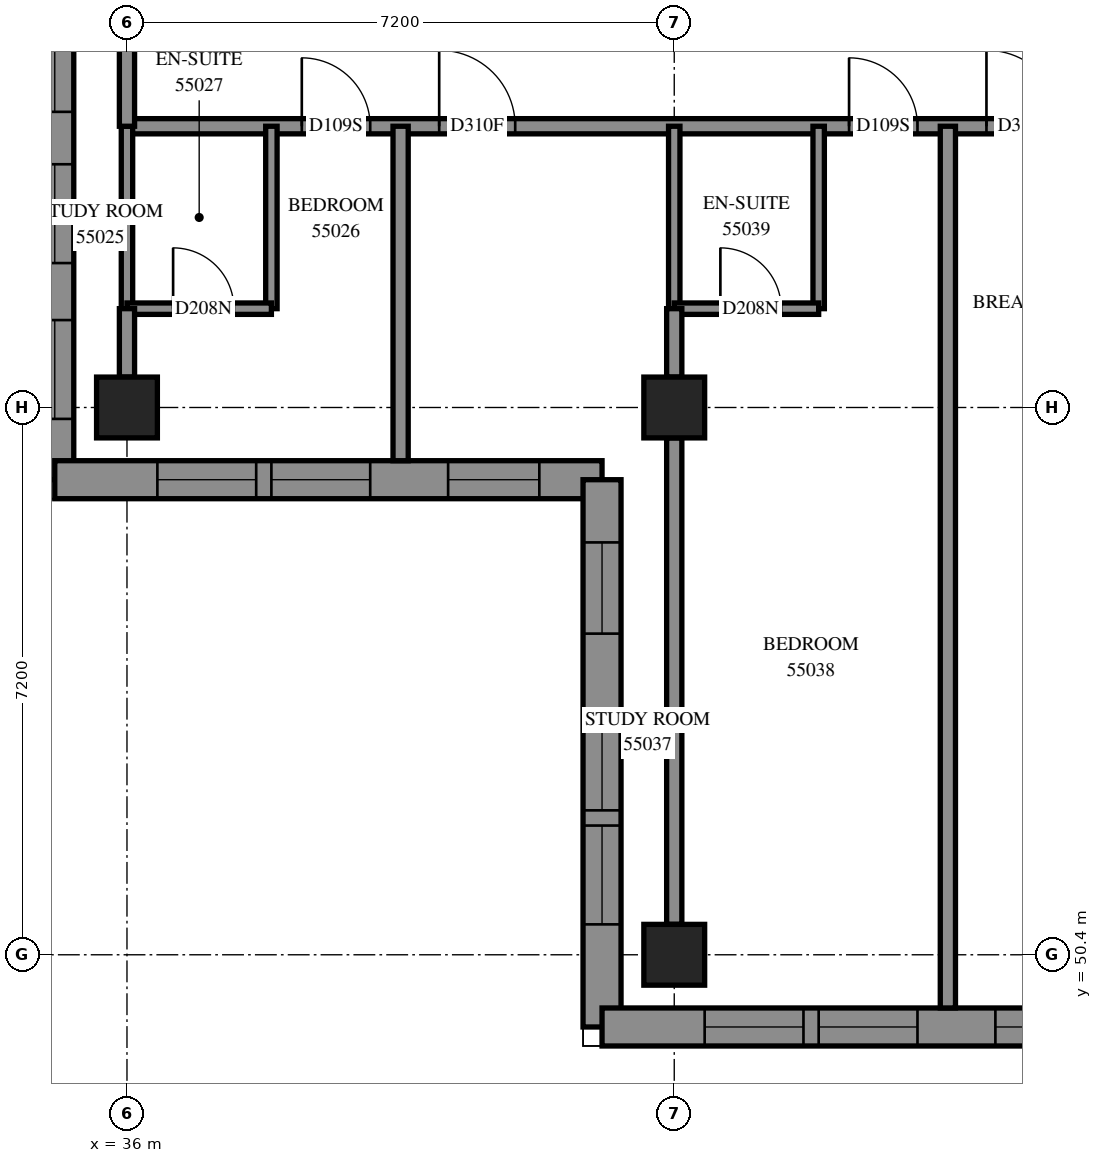
"""IFC4 building model, lengths in metres.
Left out: names, types, materials, properties, quantities, classifications, styles, units other than length and angle.
Written with IfcOpenShell. Run it as: python <this file> out.ifc"""

import sys

from ifc_helpers import new_model, si_unit, direction, frame, frame_2d, origin, origin_2d, place, context, subcontext, project, spatial, polyline, rectangle, outline, extrude, element, fill, save


model = new_model("IFC4")
c1 = context("Model", 3, precision=1e-05, world=origin(), true_north=direction((0.0, 1.0)))
c2 = subcontext(c1, "Body", "Model", "MODEL_VIEW")
j1 = project(units=[si_unit("LENGTHUNIT", "METRE"), si_unit("PLANEANGLEUNIT", "RADIAN")], contexts=[c1])
p1 = place(None, origin())
s1 = spatial("IfcSite", under=j1, at=p1, CompositionType="ELEMENT")
p2 = place(p1, origin())
s2 = spatial("IfcBuilding", under=s1, at=p2, CompositionType="ELEMENT")
p3 = place(p2, frame((0.0, 0.0, 203.2)))
s3 = spatial("IfcBuildingStorey", under=s2, at=p3, CompositionType="ELEMENT", Elevation=203.2)
for number, where, z_axis, x_axis in (
    (1, (36.0, 57.6, 0.0), (0.0, 0.0, 1.0), (1.0, 0.0, 0.0)),
    (2, (43.2, 50.4, 0.0), (0.0, 0.0, 1.0), (1.0, 0.0, 0.0)),
    (3, (43.2, 57.6, 0.0), (0.0, 0.0, 1.0), (1.0, 0.0, 0.0)),
):
    element("IfcColumn", number, at=place(p3, frame(where, z_axis=z_axis, x_axis=x_axis)), inside=s3, PredefinedType="COLUMN", context=c2, shape_type="SweptSolid", body=[
        extrude(rectangle(XDim=0.8, YDim=0.8, at=origin_2d()), origin(), (0.0, 0.0, 1.0), 3.1),
    ])
p4 = place(p3, frame((35.05, 62.829, 0.0), z_axis=(0.0, 0.0, 1.0), x_axis=(0.0, -1.0, 0.0)))
e4 = element("IfcWall", 4, at=p4, inside=s3, PredefinedType="SOLIDWALL", context=c2, shape_type="SweptSolid", body=[
    extrude(outline(polyline([(0.25, -0.25), (6.429, -0.25), (5.929, 0.25), (-0.25, 0.25), (0.25, -0.25)])), origin(), (0.0, 0.0, 1.0), 3.1),
])
p5 = place(p4, frame((2.029, 0.0, 0.45)))
e5 = element("IfcOpeningElement", 5, at=p5, cuts=e4, PredefinedType="OPENING", context=c2, shape_type="SweptSolid", body=[
    extrude(rectangle(XDim=1.3, YDim=2.5, at=frame_2d((0.65, 1.25))), frame((0.0, 0.26, 0.0), z_axis=(0.0, -1.0, 0.0), x_axis=(1.0, 0.0, 0.0)), (0.0, 0.0, 1.0), 0.52),
])
p6 = place(p4, frame((4.079, 0.0, 0.45)))
e6 = element("IfcOpeningElement", 6, at=p6, cuts=e4, PredefinedType="OPENING", context=c2, shape_type="SweptSolid", body=[
    extrude(rectangle(XDim=1.3, YDim=2.5, at=frame_2d((0.65, 1.25))), frame((0.0, 0.26, 0.0), z_axis=(0.0, -1.0, 0.0), x_axis=(1.0, 0.0, 0.0)), (0.0, 0.0, 1.0), 0.52),
])
p7 = place(p4, frame((0.34, 0.0, 0.45)))
e7 = element("IfcOpeningElement", 7, at=p7, cuts=e4, PredefinedType="OPENING", context=c2, shape_type="SweptSolid", body=[
    extrude(rectangle(XDim=1.0, YDim=2.5, at=frame_2d((0.5, 1.25))), frame((0.0, 0.26, 0.0), z_axis=(0.0, -1.0, 0.0), x_axis=(1.0, 0.0, 0.0)), (0.0, 0.0, 1.0), 0.52),
])
p8 = place(p3, frame((35.05, 56.65, 0.0), z_axis=(0.0, 0.0, 1.0), x_axis=(1.0, 0.0, 0.0)))
e8 = element("IfcWall", 8, at=p8, inside=s3, PredefinedType="SOLIDWALL", context=c2, shape_type="SweptSolid", body=[
    extrude(outline(polyline([(-0.25, -0.25), (6.95, -0.25), (7.45, 0.25), (0.25, 0.25), (-0.25, -0.25)])), origin(), (0.0, 0.0, 1.0), 3.1),
])
p9 = place(p8, frame((1.35, 0.0, 0.45)))
e9 = element("IfcOpeningElement", 9, at=p9, cuts=e8, PredefinedType="OPENING", context=c2, shape_type="SweptSolid", body=[
    extrude(rectangle(XDim=1.3, YDim=2.5, at=frame_2d((0.65, 1.25))), frame((0.0, 0.26, 0.0), z_axis=(0.0, -1.0, 0.0), x_axis=(1.0, 0.0, 0.0)), (0.0, 0.0, 1.0), 0.52),
])
p10 = place(p8, frame((2.85, 0.0, 0.45)))
e10 = element("IfcOpeningElement", 10, at=p10, cuts=e8, PredefinedType="OPENING", context=c2, shape_type="SweptSolid", body=[
    extrude(rectangle(XDim=1.3, YDim=2.5, at=frame_2d((0.65, 1.25))), frame((0.0, 0.26, 0.0), z_axis=(0.0, -1.0, 0.0), x_axis=(1.0, 0.0, 0.0)), (0.0, 0.0, 1.0), 0.52),
])
p11 = place(p8, frame((5.175, 0.0, 0.45)))
e11 = element("IfcOpeningElement", 11, at=p11, cuts=e8, PredefinedType="OPENING", context=c2, shape_type="SweptSolid", body=[
    extrude(rectangle(XDim=1.2, YDim=2.5, at=frame_2d((0.6, 1.25))), frame((0.0, 0.26, 0.0), z_axis=(0.0, -1.0, 0.0), x_axis=(1.0, 0.0, 0.0)), (0.0, 0.0, 1.0), 0.52),
])
p12 = place(p3, frame((42.25, 56.65, 0.0), z_axis=(0.0, 0.0, 1.0), x_axis=(0.0, -1.0, 0.0)))
e12 = element("IfcWall", 12, at=p12, inside=s3, PredefinedType="SOLIDWALL", context=c2, shape_type="SweptSolid", body=[
    extrude(outline(polyline([(0.25, -0.25), (7.45, -0.25), (6.95, 0.25), (-0.25, 0.25), (0.25, -0.25)])), origin(), (0.0, 0.0, 1.0), 3.1),
])
p13 = place(p12, frame((3.05, 0.0, 0.45)))
e13 = element("IfcOpeningElement", 13, at=p13, cuts=e12, PredefinedType="OPENING", context=c2, shape_type="SweptSolid", body=[
    extrude(rectangle(XDim=1.3, YDim=2.5, at=frame_2d((0.65, 1.25))), frame((0.0, 0.26, 0.0), z_axis=(0.0, -1.0, 0.0), x_axis=(1.0, 0.0, 0.0)), (0.0, 0.0, 1.0), 0.52),
])
p14 = place(p12, frame((4.55, 0.0, 0.45)))
e14 = element("IfcOpeningElement", 14, at=p14, cuts=e12, PredefinedType="OPENING", context=c2, shape_type="SweptSolid", body=[
    extrude(rectangle(XDim=1.3, YDim=2.5, at=frame_2d((0.65, 1.25))), frame((0.0, 0.26, 0.0), z_axis=(0.0, -1.0, 0.0), x_axis=(1.0, 0.0, 0.0)), (0.0, 0.0, 1.0), 0.52),
])
p15 = place(p12, frame((0.825, 0.0, 0.45)))
e15 = element("IfcOpeningElement", 15, at=p15, cuts=e12, PredefinedType="OPENING", context=c2, shape_type="SweptSolid", body=[
    extrude(rectangle(XDim=1.2, YDim=2.5, at=frame_2d((0.6, 1.25))), frame((0.0, 0.26, 0.0), z_axis=(0.0, -1.0, 0.0), x_axis=(1.0, 0.0, 0.0)), (0.0, 0.0, 1.0), 0.52),
])
p16 = place(p3, frame((42.25, 49.45, 0.0), z_axis=(0.0, 0.0, 1.0), x_axis=(1.0, 0.0, 0.0)))
e16 = element("IfcWall", 16, at=p16, inside=s3, PredefinedType="SOLIDWALL", context=c2, shape_type="SweptSolid", body=[
    extrude(outline(polyline([(-0.25, -0.25), (6.95, -0.25), (7.45, 0.25), (0.25, 0.25), (-0.25, -0.25)])), origin(), (0.0, 0.0, 1.0), 3.1),
])
p17 = place(p16, frame((1.35, 0.0, 0.45)))
e17 = element("IfcOpeningElement", 17, at=p17, cuts=e16, PredefinedType="OPENING", context=c2, shape_type="SweptSolid", body=[
    extrude(rectangle(XDim=1.3, YDim=2.5, at=frame_2d((0.65, 1.25))), frame((0.0, 0.26, 0.0), z_axis=(0.0, -1.0, 0.0), x_axis=(1.0, 0.0, 0.0)), (0.0, 0.0, 1.0), 0.52),
])
p18 = place(p16, frame((2.85, 0.0, 0.45)))
e18 = element("IfcOpeningElement", 18, at=p18, cuts=e16, PredefinedType="OPENING", context=c2, shape_type="SweptSolid", body=[
    extrude(rectangle(XDim=1.3, YDim=2.5, at=frame_2d((0.65, 1.25))), frame((0.0, 0.26, 0.0), z_axis=(0.0, -1.0, 0.0), x_axis=(1.0, 0.0, 0.0)), (0.0, 0.0, 1.0), 0.52),
])
p19 = place(p16, frame((5.175, 0.0, 0.45)))
e19 = element("IfcOpeningElement", 19, at=p19, cuts=e16, PredefinedType="OPENING", context=c2, shape_type="SweptSolid", body=[
    extrude(rectangle(XDim=1.2, YDim=2.5, at=frame_2d((0.6, 1.25))), frame((0.0, 0.26, 0.0), z_axis=(0.0, -1.0, 0.0), x_axis=(1.0, 0.0, 0.0)), (0.0, 0.0, 1.0), 0.52),
])
p20 = place(p3, frame((36.0, 61.3, 0.0), z_axis=(0.0, 0.0, 1.0), x_axis=(1.0, 0.0, 0.0)))
e20 = element("IfcWall", 20, at=p20, inside=s3, PredefinedType="PARTITIONING", context=c2, shape_type="SweptSolid", body=[
    extrude(rectangle(XDim=16.9, YDim=0.2, at=frame_2d((8.45, 0.0))), origin(), (0.0, 0.0, 1.0), 3.1),
])
p21 = place(p20, frame((2.3, 0.0, 0.0)))
e21 = element("IfcOpeningElement", 21, at=p21, cuts=e20, PredefinedType="OPENING", context=c2, shape_type="SweptSolid", body=[
    extrude(rectangle(XDim=0.9, YDim=2.1, at=frame_2d((0.45, 1.05))), frame((0.0, 0.11, 0.0), z_axis=(0.0, -1.0, 0.0), x_axis=(1.0, 0.0, 0.0)), (0.0, 0.0, 1.0), 0.22),
])
p22 = place(p20, frame((4.107, 0.0, 0.0)))
e22 = element("IfcOpeningElement", 22, at=p22, cuts=e20, PredefinedType="OPENING", context=c2, shape_type="SweptSolid", body=[
    extrude(rectangle(XDim=1.0, YDim=2.1, at=frame_2d((0.5, 1.05))), frame((0.0, 0.11, 0.0), z_axis=(0.0, -1.0, 0.0), x_axis=(1.0, 0.0, 0.0)), (0.0, 0.0, 1.0), 0.22),
])
p23 = place(p20, frame((9.5, 0.0, 0.0)))
e23 = element("IfcOpeningElement", 23, at=p23, cuts=e20, PredefinedType="OPENING", context=c2, shape_type="SweptSolid", body=[
    extrude(rectangle(XDim=0.9, YDim=2.1, at=frame_2d((0.45, 1.05))), frame((0.0, 0.11, 0.0), z_axis=(0.0, -1.0, 0.0), x_axis=(1.0, 0.0, 0.0)), (0.0, 0.0, 1.0), 0.22),
])
p24 = place(p20, frame((11.307, 0.0, 0.0)))
e24 = element("IfcOpeningElement", 24, at=p24, cuts=e20, PredefinedType="OPENING", context=c2, shape_type="SweptSolid", body=[
    extrude(rectangle(XDim=1.0, YDim=2.1, at=frame_2d((0.5, 1.05))), frame((0.0, 0.11, 0.0), z_axis=(0.0, -1.0, 0.0), x_axis=(1.0, 0.0, 0.0)), (0.0, 0.0, 1.0), 0.22),
])
p25 = place(p20, frame((15.647, 0.0, 0.0)))
e25 = element("IfcOpeningElement", 25, at=p25, cuts=e20, PredefinedType="OPENING", context=c2, shape_type="SweptSolid", body=[
    extrude(rectangle(XDim=1.0, YDim=2.1, at=frame_2d((0.5, 1.05))), frame((0.0, 0.11, 0.0), z_axis=(0.0, -1.0, 0.0), x_axis=(1.0, 0.0, 0.0)), (0.0, 0.0, 1.0), 0.22),
])
p26 = place(p3, frame((46.8, 49.7, 0.0), z_axis=(0.0, 0.0, 1.0), x_axis=(0.0, 1.0, 0.0)))
e26 = element("IfcWall", 26, at=p26, inside=s3, PredefinedType="PARTITIONING", context=c2, shape_type="SweptSolid", body=[
    extrude(rectangle(XDim=11.6, YDim=0.2, at=frame_2d((5.8, 0.0))), origin(), (0.0, 0.0, 1.0), 3.1),
])
p27 = place(p3, frame((43.2, 50.8, 0.0), z_axis=(0.0, 0.0, 1.0), x_axis=(0.0, 1.0, 0.0)))
e27 = element("IfcWall", 27, at=p27, inside=s3, PredefinedType="PARTITIONING", context=c2, shape_type="SweptSolid", body=[
    extrude(rectangle(XDim=6.4, YDim=0.2, at=frame_2d((3.2, 0.0))), origin(), (0.0, 0.0, 1.0), 2.6),
])
p28 = place(p3, frame((39.6, 56.9, 0.0), z_axis=(0.0, 0.0, 1.0), x_axis=(0.0, 1.0, 0.0)))
e28 = element("IfcWall", 28, at=p28, inside=s3, PredefinedType="PARTITIONING", context=c2, shape_type="SweptSolid", body=[
    extrude(rectangle(XDim=4.4, YDim=0.2, at=frame_2d((2.2, 0.0))), origin(), (0.0, 0.0, 1.0), 3.1),
])
p29 = place(p3, frame((37.9, 58.9, 0.0), z_axis=(0.0, 0.0, 1.0), x_axis=(0.0, 1.0, 0.0)))
e29 = element("IfcWall", 29, at=p29, inside=s3, PredefinedType="PARTITIONING", context=c2, shape_type="SweptSolid", body=[
    extrude(rectangle(XDim=2.4, YDim=0.15, at=frame_2d((1.2, 0.0))), origin(), (0.0, 0.0, 1.0), 3.1),
])
p30 = place(p3, frame((36.0, 58.9, 0.0), z_axis=(0.0, 0.0, 1.0), x_axis=(0.0, 1.0, 0.0)))
e30 = element("IfcWall", 30, at=p30, inside=s3, PredefinedType="PARTITIONING", context=c2, shape_type="SweptSolid", body=[
    extrude(rectangle(XDim=2.4, YDim=0.15, at=frame_2d((1.2, 0.0))), origin(), (0.0, 0.0, 1.0), 2.6),
])
for number, where, z_axis, x_axis in (
    (31, (45.1, 58.9, 0.0), (0.0, 0.0, 1.0), (0.0, 1.0, 0.0)),
    (32, (43.2, 58.9, 0.0), (0.0, 0.0, 1.0), (0.0, 1.0, 0.0)),
):
    element("IfcWall", number, at=place(p3, frame(where, z_axis=z_axis, x_axis=x_axis)), inside=s3, PredefinedType="PARTITIONING", context=c2, shape_type="SweptSolid", body=[
        extrude(rectangle(XDim=2.4, YDim=0.15, at=frame_2d((1.2, 0.0))), origin(), (0.0, 0.0, 1.0), 3.1),
    ])
p31 = place(p3, frame((36.0, 61.3, 0.0), z_axis=(0.0, 0.0, 1.0), x_axis=(0.0, 1.0, 0.0)))
e33 = element("IfcWall", 33, at=p31, inside=s3, PredefinedType="PARTITIONING", context=c2, shape_type="SweptSolid", body=[
    extrude(rectangle(XDim=2.2, YDim=0.2, at=frame_2d((1.1, 0.0))), origin(), (0.0, 0.0, 1.0), 2.6),
])
p32 = place(p3, frame((36.0, 58.9, 0.0), z_axis=(0.0, 0.0, 1.0), x_axis=(1.0, 0.0, 0.0)))
e34 = element("IfcWall", 34, at=p32, inside=s3, PredefinedType="PARTITIONING", context=c2, shape_type="SweptSolid", body=[
    extrude(rectangle(XDim=1.9, YDim=0.15, at=frame_2d((0.95, 0.0))), origin(), (0.0, 0.0, 1.0), 3.1),
])
p33 = place(p32, frame((0.607, 0.0, 0.0)))
e35 = element("IfcOpeningElement", 35, at=p33, cuts=e34, PredefinedType="OPENING", context=c2, shape_type="SweptSolid", body=[
    extrude(rectangle(XDim=0.8, YDim=2.1, at=frame_2d((0.4, 1.05))), frame((0.0, 0.085, 0.0), z_axis=(0.0, -1.0, 0.0), x_axis=(1.0, 0.0, 0.0)), (0.0, 0.0, 1.0), 0.17),
])
p34 = place(p3, frame((43.2, 58.9, 0.0), z_axis=(0.0, 0.0, 1.0), x_axis=(1.0, 0.0, 0.0)))
e36 = element("IfcWall", 36, at=p34, inside=s3, PredefinedType="PARTITIONING", context=c2, shape_type="SweptSolid", body=[
    extrude(rectangle(XDim=1.9, YDim=0.15, at=frame_2d((0.95, 0.0))), origin(), (0.0, 0.0, 1.0), 3.1),
])
p35 = place(p34, frame((0.607, 0.0, 0.0)))
e37 = element("IfcOpeningElement", 37, at=p35, cuts=e36, PredefinedType="OPENING", context=c2, shape_type="SweptSolid", body=[
    extrude(rectangle(XDim=0.8, YDim=2.1, at=frame_2d((0.4, 1.05))), frame((0.0, 0.085, 0.0), z_axis=(0.0, -1.0, 0.0), x_axis=(1.0, 0.0, 0.0)), (0.0, 0.0, 1.0), 0.17),
])
p36 = place(p3, frame((36.0, 58.0, 0.0), z_axis=(0.0, 0.0, 1.0), x_axis=(0.0, 1.0, 0.0)))
e38 = element("IfcWall", 38, at=p36, inside=s3, PredefinedType="PARTITIONING", context=c2, shape_type="SweptSolid", body=[
    extrude(rectangle(XDim=0.9, YDim=0.2, at=frame_2d((0.45, 0.0))), origin(), (0.0, 0.0, 1.0), 2.6),
])
p37 = place(p3, frame((43.2, 58.0, 0.0), z_axis=(0.0, 0.0, 1.0), x_axis=(0.0, 1.0, 0.0)))
e39 = element("IfcWall", 39, at=p37, inside=s3, PredefinedType="PARTITIONING", context=c2, shape_type="SweptSolid", body=[
    extrude(rectangle(XDim=0.9, YDim=0.2, at=frame_2d((0.45, 0.0))), origin(), (0.0, 0.0, 1.0), 3.1),
])
p38 = place(p5, origin())
e40 = element("IfcWindow", 40, at=p38, inside=s3, PartitioningType="SINGLE_PANEL", PredefinedType="WINDOW", context=c2, shape_type="SweptSolid", body=[
    extrude(rectangle(XDim=1.3, YDim=2.5, at=frame_2d((0.65, 1.25))), frame((0.0, 0.18, 0.0), z_axis=(0.0, -1.0, 0.0), x_axis=(1.0, 0.0, 0.0)), (0.0, 0.0, 1.0), 0.06),
])
fill(e5, e40)
p39 = place(p6, origin())
e41 = element("IfcWindow", 41, at=p39, inside=s3, PartitioningType="SINGLE_PANEL", PredefinedType="WINDOW", context=c2, shape_type="SweptSolid", body=[
    extrude(rectangle(XDim=1.3, YDim=2.5, at=frame_2d((0.65, 1.25))), frame((0.0, 0.18, 0.0), z_axis=(0.0, -1.0, 0.0), x_axis=(1.0, 0.0, 0.0)), (0.0, 0.0, 1.0), 0.06),
])
fill(e6, e41)
p40 = place(p9, origin())
e42 = element("IfcWindow", 42, at=p40, inside=s3, PartitioningType="SINGLE_PANEL", PredefinedType="WINDOW", context=c2, shape_type="SweptSolid", body=[
    extrude(rectangle(XDim=1.3, YDim=2.5, at=frame_2d((0.65, 1.25))), frame((0.0, 0.18, 0.0), z_axis=(0.0, -1.0, 0.0), x_axis=(1.0, 0.0, 0.0)), (0.0, 0.0, 1.0), 0.06),
])
fill(e9, e42)
p41 = place(p10, origin())
e43 = element("IfcWindow", 43, at=p41, inside=s3, PartitioningType="SINGLE_PANEL", PredefinedType="WINDOW", context=c2, shape_type="SweptSolid", body=[
    extrude(rectangle(XDim=1.3, YDim=2.5, at=frame_2d((0.65, 1.25))), frame((0.0, 0.18, 0.0), z_axis=(0.0, -1.0, 0.0), x_axis=(1.0, 0.0, 0.0)), (0.0, 0.0, 1.0), 0.06),
])
fill(e10, e43)
p42 = place(p11, origin())
e44 = element("IfcWindow", 44, at=p42, inside=s3, PartitioningType="SINGLE_PANEL", PredefinedType="WINDOW", context=c2, shape_type="SweptSolid", body=[
    extrude(rectangle(XDim=1.2, YDim=2.5, at=frame_2d((0.6, 1.25))), frame((0.0, 0.18, 0.0), z_axis=(0.0, -1.0, 0.0), x_axis=(1.0, 0.0, 0.0)), (0.0, 0.0, 1.0), 0.06),
])
fill(e11, e44)
p43 = place(p13, origin())
e45 = element("IfcWindow", 45, at=p43, inside=s3, PartitioningType="SINGLE_PANEL", PredefinedType="WINDOW", context=c2, shape_type="SweptSolid", body=[
    extrude(rectangle(XDim=1.3, YDim=2.5, at=frame_2d((0.65, 1.25))), frame((0.0, 0.18, 0.0), z_axis=(0.0, -1.0, 0.0), x_axis=(1.0, 0.0, 0.0)), (0.0, 0.0, 1.0), 0.06),
])
fill(e13, e45)
p44 = place(p14, origin())
e46 = element("IfcWindow", 46, at=p44, inside=s3, PartitioningType="SINGLE_PANEL", PredefinedType="WINDOW", context=c2, shape_type="SweptSolid", body=[
    extrude(rectangle(XDim=1.3, YDim=2.5, at=frame_2d((0.65, 1.25))), frame((0.0, 0.18, 0.0), z_axis=(0.0, -1.0, 0.0), x_axis=(1.0, 0.0, 0.0)), (0.0, 0.0, 1.0), 0.06),
])
fill(e14, e46)
p45 = place(p15, origin())
e47 = element("IfcWindow", 47, at=p45, inside=s3, PartitioningType="SINGLE_PANEL", PredefinedType="WINDOW", context=c2, shape_type="SweptSolid", body=[
    extrude(rectangle(XDim=1.2, YDim=2.5, at=frame_2d((0.6, 1.25))), frame((0.0, 0.18, 0.0), z_axis=(0.0, -1.0, 0.0), x_axis=(1.0, 0.0, 0.0)), (0.0, 0.0, 1.0), 0.06),
])
fill(e15, e47)
p46 = place(p17, origin())
e48 = element("IfcWindow", 48, at=p46, inside=s3, PartitioningType="SINGLE_PANEL", PredefinedType="WINDOW", context=c2, shape_type="SweptSolid", body=[
    extrude(rectangle(XDim=1.3, YDim=2.5, at=frame_2d((0.65, 1.25))), frame((0.0, 0.18, 0.0), z_axis=(0.0, -1.0, 0.0), x_axis=(1.0, 0.0, 0.0)), (0.0, 0.0, 1.0), 0.06),
])
fill(e17, e48)
p47 = place(p18, origin())
e49 = element("IfcWindow", 49, at=p47, inside=s3, PartitioningType="SINGLE_PANEL", PredefinedType="WINDOW", context=c2, shape_type="SweptSolid", body=[
    extrude(rectangle(XDim=1.3, YDim=2.5, at=frame_2d((0.65, 1.25))), frame((0.0, 0.18, 0.0), z_axis=(0.0, -1.0, 0.0), x_axis=(1.0, 0.0, 0.0)), (0.0, 0.0, 1.0), 0.06),
])
fill(e18, e49)
p48 = place(p19, origin())
e50 = element("IfcWindow", 50, at=p48, inside=s3, PartitioningType="SINGLE_PANEL", PredefinedType="WINDOW", context=c2, shape_type="SweptSolid", body=[
    extrude(rectangle(XDim=1.2, YDim=2.5, at=frame_2d((0.6, 1.25))), frame((0.0, 0.18, 0.0), z_axis=(0.0, -1.0, 0.0), x_axis=(1.0, 0.0, 0.0)), (0.0, 0.0, 1.0), 0.06),
])
fill(e19, e50)
p49 = place(p21, origin())
e51 = element("IfcDoor", 51, at=p49, inside=s3, OperationType="SINGLE_SWING_LEFT", PredefinedType="DOOR", context=c2, shape_type="SweptSolid", body=[
    extrude(rectangle(XDim=0.9, YDim=2.1, at=frame_2d((0.45, 1.05))), frame((0.0, 0.025, 0.0), z_axis=(0.0, -1.0, 0.0), x_axis=(1.0, 0.0, 0.0)), (0.0, 0.0, 1.0), 0.05),
])
fill(e21, e51)
p50 = place(p33, origin())
e52 = element("IfcDoor", 52, at=p50, inside=s3, OperationType="SINGLE_SWING_RIGHT", PredefinedType="DOOR", context=c2, shape_type="SweptSolid", body=[
    extrude(rectangle(XDim=0.8, YDim=2.1, at=frame_2d((0.4, 1.05))), frame((0.0, 0.025, 0.0), z_axis=(0.0, -1.0, 0.0), x_axis=(1.0, 0.0, 0.0)), (0.0, 0.0, 1.0), 0.05),
])
fill(e35, e52)
p51 = place(p22, origin())
e53 = element("IfcDoor", 53, at=p51, inside=s3, OperationType="SINGLE_SWING_RIGHT", PredefinedType="DOOR", context=c2, shape_type="SweptSolid", body=[
    extrude(rectangle(XDim=1.0, YDim=2.1, at=frame_2d((0.5, 1.05))), frame((0.0, 0.025, 0.0), z_axis=(0.0, -1.0, 0.0), x_axis=(1.0, 0.0, 0.0)), (0.0, 0.0, 1.0), 0.05),
])
fill(e22, e53)
p52 = place(p23, origin())
e54 = element("IfcDoor", 54, at=p52, inside=s3, OperationType="SINGLE_SWING_LEFT", PredefinedType="DOOR", context=c2, shape_type="SweptSolid", body=[
    extrude(rectangle(XDim=0.9, YDim=2.1, at=frame_2d((0.45, 1.05))), frame((0.0, 0.025, 0.0), z_axis=(0.0, -1.0, 0.0), x_axis=(1.0, 0.0, 0.0)), (0.0, 0.0, 1.0), 0.05),
])
fill(e23, e54)
p53 = place(p35, origin())
e55 = element("IfcDoor", 55, at=p53, inside=s3, OperationType="SINGLE_SWING_RIGHT", PredefinedType="DOOR", context=c2, shape_type="SweptSolid", body=[
    extrude(rectangle(XDim=0.8, YDim=2.1, at=frame_2d((0.4, 1.05))), frame((0.0, 0.025, 0.0), z_axis=(0.0, -1.0, 0.0), x_axis=(1.0, 0.0, 0.0)), (0.0, 0.0, 1.0), 0.05),
])
fill(e37, e55)
p54 = place(p24, origin())
e56 = element("IfcDoor", 56, at=p54, inside=s3, OperationType="SINGLE_SWING_RIGHT", PredefinedType="DOOR", context=c2, shape_type="SweptSolid", body=[
    extrude(rectangle(XDim=1.0, YDim=2.1, at=frame_2d((0.5, 1.05))), frame((0.0, 0.025, 0.0), z_axis=(0.0, -1.0, 0.0), x_axis=(1.0, 0.0, 0.0)), (0.0, 0.0, 1.0), 0.05),
])
fill(e24, e56)
p55 = place(p7, origin())
e57 = element("IfcWindow", 57, at=p55, inside=s3, PartitioningType="SINGLE_PANEL", PredefinedType="WINDOW", context=c2, shape_type="SweptSolid", body=[
    extrude(rectangle(XDim=1.0, YDim=2.5, at=frame_2d((0.5, 1.25))), frame((0.0, 0.18, 0.0), z_axis=(0.0, -1.0, 0.0), x_axis=(1.0, 0.0, 0.0)), (0.0, 0.0, 1.0), 0.06),
])
fill(e7, e57)
save(model, sys.argv[1])
